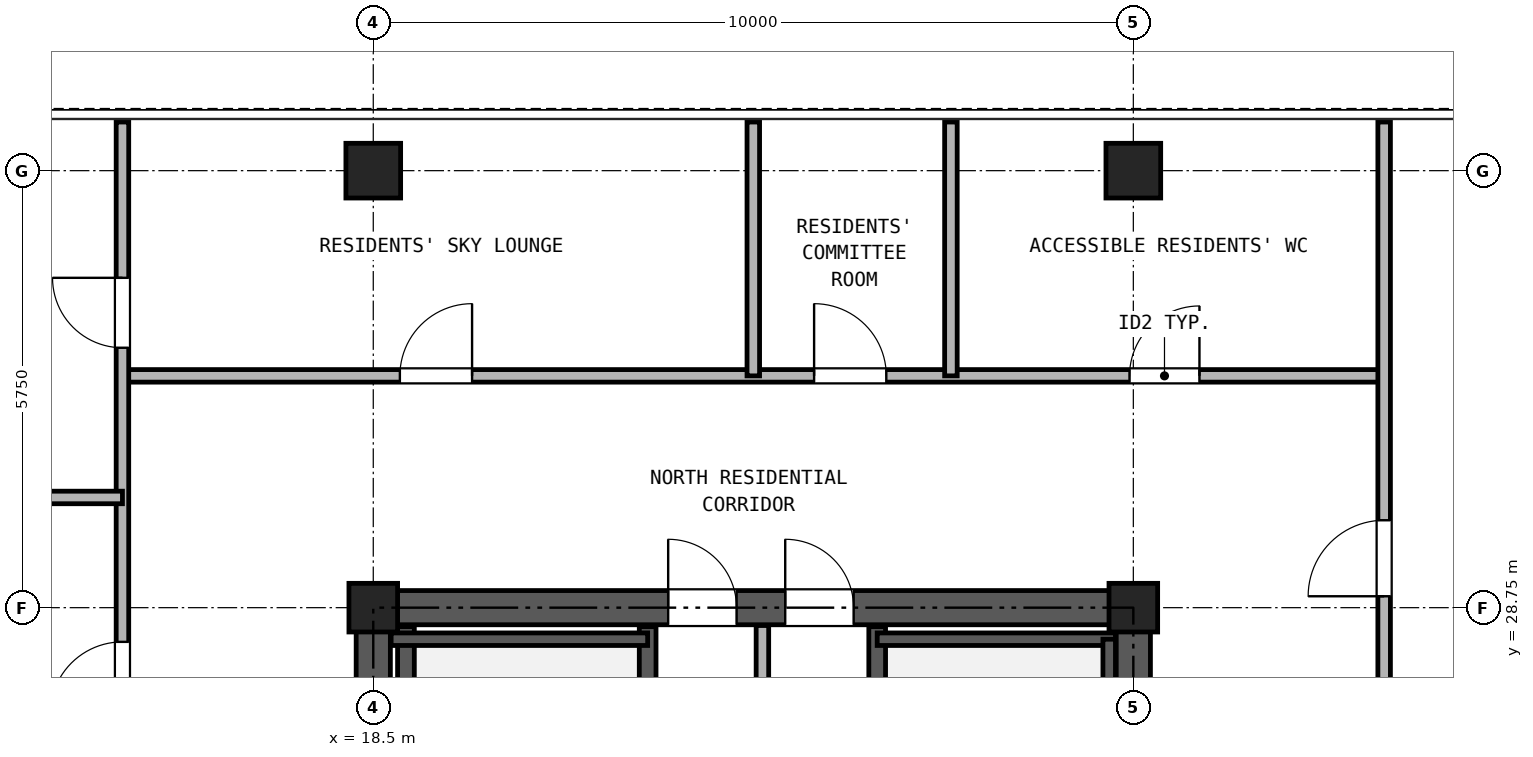
"""IFC4 building model, lengths in metres.
Left out: names, types, materials, properties, quantities, classifications, styles, units other than length and angle.
Written with IfcOpenShell. Run it as: python <this file> out.ifc"""

import sys

from ifc_helpers import new_model, si_unit, direction, frame, frame_2d, origin, origin_2d, place, context, subcontext, project, spatial, rectangle, hollow_rectangle, extrude, source, transform, mapped, element, fill, save


model = new_model("IFC4")
c1 = context("Model", 3, precision=1e-05, world=origin(), true_north=direction((0.0, 1.0)))
c2 = subcontext(c1, "Body", "Model", "MODEL_VIEW")
j1 = project(units=[si_unit("LENGTHUNIT", "METRE"), si_unit("PLANEANGLEUNIT", "RADIAN")], contexts=[c1])
p1 = place(None, origin())
s1 = spatial("IfcSite", under=j1, at=p1, CompositionType="ELEMENT")
p2 = place(p1, origin())
s2 = spatial("IfcBuilding", under=s1, at=p2, CompositionType="ELEMENT")
p3 = place(p2, frame((0.0, 0.0, 165.7)))
s3 = spatial("IfcBuildingStorey", under=s2, at=p3, CompositionType="ELEMENT", Elevation=165.7)
m1 = source(origin(), c2, "Body", "SweptSolid", [
    extrude(hollow_rectangle(XDim=0.72, YDim=0.72, WallThickness=0.04, at=origin_2d()), origin(), (0.0, 0.0, 1.0), 2.95),
])
for number, where, z_axis, x_axis in (
    (1, (18.5, 34.5, 0.0), (0.0, 0.0, 1.0), (1.0, 0.0, 0.0)),
    (2, (28.5, 34.5, 0.0), (0.0, 0.0, 1.0), (1.0, 0.0, 0.0)),
):
    element("IfcColumn", number, at=place(p3, frame(where, z_axis=z_axis, x_axis=x_axis)), inside=s3, PredefinedType="COLUMN", context=c2, shape_type="MappedRepresentation", body=[
        mapped(m1, transform((0.0, 0.0, 0.0), x_axis=(1.0, 0.0, 0.0), y_axis=(0.0, 1.0, 0.0), z_axis=(0.0, 0.0, 1.0), scale=1.0)),
    ])
m2 = source(origin(), c2, "Body", "SweptSolid", [
    extrude(hollow_rectangle(XDim=0.64, YDim=0.64, WallThickness=0.035, at=origin_2d()), origin(), (0.0, 0.0, 1.0), 2.95),
])
for number, where, z_axis, x_axis in (
    (3, (18.5, 28.75, 0.0), (0.0, 0.0, 1.0), (1.0, 0.0, 0.0)),
    (4, (28.5, 28.75, 0.0), (0.0, 0.0, 1.0), (1.0, 0.0, 0.0)),
):
    element("IfcColumn", number, at=place(p3, frame(where, z_axis=z_axis, x_axis=x_axis)), inside=s3, PredefinedType="COLUMN", context=c2, shape_type="MappedRepresentation", body=[
        mapped(m2, transform((0.0, 0.0, 0.0), x_axis=(1.0, 0.0, 0.0), y_axis=(0.0, 1.0, 0.0), z_axis=(0.0, 0.0, 1.0), scale=1.0)),
    ])
p4 = place(p3, frame((18.275, 28.75, 0.0), z_axis=(0.0, 0.0, 1.0), x_axis=(1.0, 0.0, 0.0)))
e5 = element("IfcWall", 5, at=p4, inside=s3, PredefinedType="SHEAR", context=c2, shape_type="SweptSolid", body=[
    extrude(rectangle(XDim=10.45, YDim=0.45, at=frame_2d((5.225, 0.0))), origin(), (0.0, 0.0, 1.0), 2.95),
])
p5 = place(p4, frame((4.105, 0.0, 0.0)))
e6 = element("IfcOpeningElement", 6, at=p5, cuts=e5, PredefinedType="OPENING", context=c2, shape_type="SweptSolid", body=[
    extrude(rectangle(XDim=0.9, YDim=2.05, at=frame_2d((0.45, 1.025))), frame((0.0, 0.235, 0.0), z_axis=(0.0, -1.0, 0.0), x_axis=(1.0, 0.0, 0.0)), (0.0, 0.0, 1.0), 0.47),
])
p6 = place(p4, frame((5.645, 0.0, 0.0)))
e7 = element("IfcOpeningElement", 7, at=p6, cuts=e5, PredefinedType="OPENING", context=c2, shape_type="SweptSolid", body=[
    extrude(rectangle(XDim=0.9, YDim=2.05, at=frame_2d((0.45, 1.025))), frame((0.0, 0.235, 0.0), z_axis=(0.0, -1.0, 0.0), x_axis=(1.0, 0.0, 0.0)), (0.0, 0.0, 1.0), 0.47),
])
p7 = place(p3, frame((18.5, 11.725, 0.0), z_axis=(0.0, 0.0, 1.0), x_axis=(0.0, 1.0, 0.0)))
e8 = element("IfcWall", 8, at=p7, inside=s3, PredefinedType="SHEAR", context=c2, shape_type="SweptSolid", body=[
    extrude(rectangle(XDim=16.8, YDim=0.45, at=frame_2d((8.4, 0.0))), origin(), (0.0, 0.0, 1.0), 2.95),
])
p8 = place(p7, frame((7.425, 0.0, 0.0)))
e9 = element("IfcOpeningElement", 9, at=p8, cuts=e8, PredefinedType="OPENING", context=c2, shape_type="SweptSolid", body=[
    extrude(rectangle(XDim=1.15, YDim=2.2, at=frame_2d((0.575, 1.1))), frame((0.0, 0.235, 0.0), z_axis=(0.0, -1.0, 0.0), x_axis=(1.0, 0.0, 0.0)), (0.0, 0.0, 1.0), 0.47),
])
p9 = place(p3, frame((28.5, 11.725, 0.0), z_axis=(0.0, 0.0, 1.0), x_axis=(0.0, 1.0, 0.0)))
e10 = element("IfcWall", 10, at=p9, inside=s3, PredefinedType="SHEAR", context=c2, shape_type="SweptSolid", body=[
    extrude(rectangle(XDim=16.8, YDim=0.45, at=frame_2d((8.4, 0.0))), origin(), (0.0, 0.0, 1.0), 2.95),
])
p10 = place(p9, frame((7.425, 0.0, 0.0)))
e11 = element("IfcOpeningElement", 11, at=p10, cuts=e10, PredefinedType="OPENING", context=c2, shape_type="SweptSolid", body=[
    extrude(rectangle(XDim=1.15, YDim=2.2, at=frame_2d((0.575, 1.1))), frame((0.0, 0.235, 0.0), z_axis=(0.0, -1.0, 0.0), x_axis=(1.0, 0.0, 0.0)), (0.0, 0.0, 1.0), 0.47),
])
for number, where, z_axis, x_axis in (
    (12, (18.93, 21.39, 0.0), (0.0, 0.0, 1.0), (0.0, 1.0, 0.0)),
    (13, (22.11, 21.39, 0.0), (0.0, 0.0, 1.0), (0.0, 1.0, 0.0)),
    (14, (25.13, 21.39, 0.0), (0.0, 0.0, 1.0), (0.0, 1.0, 0.0)),
):
    element("IfcWall", number, at=place(p3, frame(where, z_axis=z_axis, x_axis=x_axis)), inside=s3, PredefinedType="SOLIDWALL", context=c2, shape_type="SweptSolid", body=[
        extrude(rectangle(XDim=7.11, YDim=0.22, at=frame_2d((3.555, 0.0))), origin(), (0.0, 0.0, 1.0), 2.95),
    ])
p11 = place(p3, frame((18.735, 28.335, 0.0), z_axis=(0.0, 0.0, 1.0), x_axis=(1.0, 0.0, 0.0)))
e15 = element("IfcWall", 15, at=p11, inside=s3, PredefinedType="PARTITIONING", context=c2, shape_type="SweptSolid", body=[
    extrude(rectangle(XDim=3.375, YDim=0.165, at=frame_2d((1.688, 0.0))), origin(), (0.0, 0.0, 1.0), 2.95),
])
p12 = place(p3, frame((25.13, 28.335, 0.0), z_axis=(0.0, 0.0, 1.0), x_axis=(1.0, 0.0, 0.0)))
e16 = element("IfcWall", 16, at=p12, inside=s3, PredefinedType="PARTITIONING", context=c2, shape_type="SweptSolid", body=[
    extrude(rectangle(XDim=3.135, YDim=0.165, at=frame_2d((1.567, 0.0))), origin(), (0.0, 0.0, 1.0), 2.95),
])
p13 = place(p3, frame((28.183, 21.39, 0.0), z_axis=(0.0, 0.0, 1.0), x_axis=(0.0, 1.0, 0.0)))
e17 = element("IfcWall", 17, at=p13, inside=s3, PredefinedType="PARTITIONING", context=c2, shape_type="SweptSolid", body=[
    extrude(rectangle(XDim=6.945, YDim=0.165, at=frame_2d((3.473, 0.0))), origin(), (0.0, 0.0, 1.0), 2.95),
])
p14 = place(p3, frame((23.62, 24.4, 0.0), z_axis=(0.0, 0.0, 1.0), x_axis=(0.0, 1.0, 0.0)))
e18 = element("IfcWall", 18, at=p14, inside=s3, PredefinedType="PARTITIONING", context=c2, shape_type="SweptSolid", body=[
    extrude(rectangle(XDim=4.115, YDim=0.165, at=frame_2d((2.058, 0.0))), origin(), (0.0, 0.0, 1.0), 2.95),
])
p15 = place(p3, frame((15.2, 31.8, 0.0), z_axis=(0.0, 0.0, 1.0), x_axis=(1.0, 0.0, 0.0)))
e19 = element("IfcWall", 19, at=p15, inside=s3, PredefinedType="PARTITIONING", context=c2, shape_type="SweptSolid", body=[
    extrude(rectangle(XDim=16.6, YDim=0.165, at=frame_2d((8.3, 0.0))), origin(), (0.0, 0.0, 1.0), 2.583),
])
p16 = place(p15, frame((3.65, 0.0, 0.0)))
e20 = element("IfcOpeningElement", 20, at=p16, cuts=e19, PredefinedType="OPENING", context=c2, shape_type="SweptSolid", body=[
    extrude(rectangle(XDim=0.95, YDim=2.15, at=frame_2d((0.475, 1.075))), frame((0.0, 0.093, 0.0), z_axis=(0.0, -1.0, 0.0), x_axis=(1.0, 0.0, 0.0)), (0.0, 0.0, 1.0), 0.185),
])
p17 = place(p15, frame((9.1, 0.0, 0.0)))
e21 = element("IfcOpeningElement", 21, at=p17, cuts=e19, PredefinedType="OPENING", context=c2, shape_type="SweptSolid", body=[
    extrude(rectangle(XDim=0.95, YDim=2.15, at=frame_2d((0.475, 1.075))), frame((0.0, 0.093, 0.0), z_axis=(0.0, -1.0, 0.0), x_axis=(1.0, 0.0, 0.0)), (0.0, 0.0, 1.0), 0.185),
])
p18 = place(p15, frame((13.25, 0.0, 0.0)))
e22 = element("IfcOpeningElement", 22, at=p18, cuts=e19, PredefinedType="OPENING", context=c2, shape_type="SweptSolid", body=[
    extrude(rectangle(XDim=0.92, YDim=2.1, at=frame_2d((0.46, 1.05))), frame((0.0, 0.093, 0.0), z_axis=(0.0, -1.0, 0.0), x_axis=(1.0, 0.0, 0.0)), (0.0, 0.0, 1.0), 0.185),
])
p19 = place(p3, frame((15.2, 10.65, 0.0), z_axis=(0.0, 0.0, 1.0), x_axis=(0.0, 1.0, 0.0)))
e23 = element("IfcWall", 23, at=p19, inside=s3, PredefinedType="PARTITIONING", context=c2, shape_type="SweptSolid", body=[
    extrude(rectangle(XDim=24.49, YDim=0.165, at=frame_2d((12.245, 0.0))), origin(), (0.0, 0.0, 1.0), 2.95),
])
p20 = place(p19, frame((3.425, 0.0, 0.0)))
e24 = element("IfcOpeningElement", 24, at=p20, cuts=e23, PredefinedType="OPENING", context=c2, shape_type="SweptSolid", body=[
    extrude(rectangle(XDim=0.95, YDim=2.15, at=frame_2d((0.475, 1.075))), frame((0.0, 0.093, 0.0), z_axis=(0.0, -1.0, 0.0), x_axis=(1.0, 0.0, 0.0)), (0.0, 0.0, 1.0), 0.185),
])
p21 = place(p19, frame((10.85, 0.0, 0.0)))
e25 = element("IfcOpeningElement", 25, at=p21, cuts=e23, PredefinedType="OPENING", context=c2, shape_type="SweptSolid", body=[
    extrude(rectangle(XDim=0.95, YDim=2.15, at=frame_2d((0.475, 1.075))), frame((0.0, 0.093, 0.0), z_axis=(0.0, -1.0, 0.0), x_axis=(1.0, 0.0, 0.0)), (0.0, 0.0, 1.0), 0.185),
])
p22 = place(p19, frame((16.7, 0.0, 0.0)))
e26 = element("IfcOpeningElement", 26, at=p22, cuts=e23, PredefinedType="OPENING", context=c2, shape_type="SweptSolid", body=[
    extrude(rectangle(XDim=0.95, YDim=2.15, at=frame_2d((0.475, 1.075))), frame((0.0, 0.093, 0.0), z_axis=(0.0, -1.0, 0.0), x_axis=(1.0, 0.0, 0.0)), (0.0, 0.0, 1.0), 0.185),
])
p23 = place(p19, frame((21.52, 0.0, 0.0)))
e27 = element("IfcOpeningElement", 27, at=p23, cuts=e23, PredefinedType="OPENING", context=c2, shape_type="SweptSolid", body=[
    extrude(rectangle(XDim=0.92, YDim=2.1, at=frame_2d((0.46, 1.05))), frame((0.0, 0.093, 0.0), z_axis=(0.0, -1.0, 0.0), x_axis=(1.0, 0.0, 0.0)), (0.0, 0.0, 1.0), 0.185),
])
p24 = place(p3, frame((31.8, 10.65, 0.0), z_axis=(0.0, 0.0, 1.0), x_axis=(0.0, 1.0, 0.0)))
e28 = element("IfcWall", 28, at=p24, inside=s3, PredefinedType="PARTITIONING", context=c2, shape_type="SweptSolid", body=[
    extrude(rectangle(XDim=24.49, YDim=0.165, at=frame_2d((12.245, 0.0))), origin(), (0.0, 0.0, 1.0), 2.95),
])
p25 = place(p24, frame((3.425, 0.0, 0.0)))
e29 = element("IfcOpeningElement", 29, at=p25, cuts=e28, PredefinedType="OPENING", context=c2, shape_type="SweptSolid", body=[
    extrude(rectangle(XDim=1.0, YDim=2.15, at=frame_2d((0.5, 1.075))), frame((0.0, 0.093, 0.0), z_axis=(0.0, -1.0, 0.0), x_axis=(1.0, 0.0, 0.0)), (0.0, 0.0, 1.0), 0.185),
])
p26 = place(p24, frame((11.6, 0.0, 0.0)))
e30 = element("IfcOpeningElement", 30, at=p26, cuts=e28, PredefinedType="OPENING", context=c2, shape_type="SweptSolid", body=[
    extrude(rectangle(XDim=1.0, YDim=2.15, at=frame_2d((0.5, 1.075))), frame((0.0, 0.093, 0.0), z_axis=(0.0, -1.0, 0.0), x_axis=(1.0, 0.0, 0.0)), (0.0, 0.0, 1.0), 0.185),
])
p27 = place(p24, frame((18.25, 0.0, 0.0)))
e31 = element("IfcOpeningElement", 31, at=p27, cuts=e28, PredefinedType="OPENING", context=c2, shape_type="SweptSolid", body=[
    extrude(rectangle(XDim=1.0, YDim=2.15, at=frame_2d((0.5, 1.075))), frame((0.0, 0.093, 0.0), z_axis=(0.0, -1.0, 0.0), x_axis=(1.0, 0.0, 0.0)), (0.0, 0.0, 1.0), 0.185),
])
p28 = place(p3, frame((0.16, 30.2, 0.0), z_axis=(0.0, 0.0, 1.0), x_axis=(1.0, 0.0, 0.0)))
e32 = element("IfcWall", 32, at=p28, inside=s3, PredefinedType="PARTITIONING", context=c2, shape_type="SweptSolid", body=[
    extrude(rectangle(XDim=15.04, YDim=0.165, at=frame_2d((7.52, 0.0))), origin(), (0.0, 0.0, 1.0), 2.95),
])
for number, where, z_axis, x_axis in (
    (33, (23.5, 31.8, 0.0), (0.0, 0.0, 1.0), (0.0, 1.0, 0.0)),
    (34, (26.1, 31.8, 0.0), (0.0, 0.0, 1.0), (0.0, 1.0, 0.0)),
):
    element("IfcWall", number, at=place(p3, frame(where, z_axis=z_axis, x_axis=x_axis)), inside=s3, PredefinedType="PARTITIONING", context=c2, shape_type="SweptSolid", body=[
        extrude(rectangle(XDim=3.34, YDim=0.165, at=frame_2d((1.67, 0.0))), origin(), (0.0, 0.0, 1.0), 2.95),
    ])
p29 = place(p5, origin())
e35 = element("IfcDoor", 35, at=p29, inside=s3, OperationType="SINGLE_SWING_LEFT", PredefinedType="DOOR", context=c2, shape_type="SweptSolid", body=[
    extrude(rectangle(XDim=0.9, YDim=2.05, at=frame_2d((0.45, 1.025))), frame((0.0, 0.025, 0.0), z_axis=(0.0, -1.0, 0.0), x_axis=(1.0, 0.0, 0.0)), (0.0, 0.0, 1.0), 0.05),
])
fill(e6, e35)
p30 = place(p6, origin())
e36 = element("IfcDoor", 36, at=p30, inside=s3, OperationType="SINGLE_SWING_LEFT", PredefinedType="DOOR", context=c2, shape_type="SweptSolid", body=[
    extrude(rectangle(XDim=0.9, YDim=2.05, at=frame_2d((0.45, 1.025))), frame((0.0, 0.025, 0.0), z_axis=(0.0, -1.0, 0.0), x_axis=(1.0, 0.0, 0.0)), (0.0, 0.0, 1.0), 0.05),
])
fill(e7, e36)
p31 = place(p22, frame((0.95, 0.0, 0.0), z_axis=(0.0, 0.0, 1.0), x_axis=(-1.0, 0.0, 0.0)))
e37 = element("IfcDoor", 37, at=p31, inside=s3, OperationType="SINGLE_SWING_LEFT", PredefinedType="DOOR", context=c2, shape_type="SweptSolid", body=[
    extrude(rectangle(XDim=0.95, YDim=2.15, at=frame_2d((0.475, 1.075))), frame((0.0, 0.025, 0.0), z_axis=(0.0, -1.0, 0.0), x_axis=(1.0, 0.0, 0.0)), (0.0, 0.0, 1.0), 0.05),
])
fill(e26, e37)
p32 = place(p23, frame((0.92, 0.0, 0.0), z_axis=(0.0, 0.0, 1.0), x_axis=(-1.0, 0.0, 0.0)))
e38 = element("IfcDoor", 38, at=p32, inside=s3, OperationType="SINGLE_SWING_RIGHT", PredefinedType="DOOR", context=c2, shape_type="SweptSolid", body=[
    extrude(rectangle(XDim=0.92, YDim=2.1, at=frame_2d((0.46, 1.05))), frame((0.0, 0.025, 0.0), z_axis=(0.0, -1.0, 0.0), x_axis=(1.0, 0.0, 0.0)), (0.0, 0.0, 1.0), 0.05),
])
fill(e27, e38)
p33 = place(p27, frame((1.0, 0.0, 0.0), z_axis=(0.0, 0.0, 1.0), x_axis=(-1.0, 0.0, 0.0)))
e39 = element("IfcDoor", 39, at=p33, inside=s3, OperationType="SINGLE_SWING_LEFT", PredefinedType="DOOR", context=c2, shape_type="SweptSolid", body=[
    extrude(rectangle(XDim=1.0, YDim=2.15, at=frame_2d((0.5, 1.075))), frame((0.0, 0.025, 0.0), z_axis=(0.0, -1.0, 0.0), x_axis=(1.0, 0.0, 0.0)), (0.0, 0.0, 1.0), 0.05),
])
fill(e31, e39)
p34 = place(p16, origin())
e40 = element("IfcDoor", 40, at=p34, inside=s3, OperationType="SINGLE_SWING_RIGHT", PredefinedType="DOOR", context=c2, shape_type="SweptSolid", body=[
    extrude(rectangle(XDim=0.95, YDim=2.15, at=frame_2d((0.475, 1.075))), frame((0.0, 0.025, 0.0), z_axis=(0.0, -1.0, 0.0), x_axis=(1.0, 0.0, 0.0)), (0.0, 0.0, 1.0), 0.05),
])
fill(e20, e40)
p35 = place(p17, origin())
e41 = element("IfcDoor", 41, at=p35, inside=s3, OperationType="SINGLE_SWING_LEFT", PredefinedType="DOOR", context=c2, shape_type="SweptSolid", body=[
    extrude(rectangle(XDim=0.95, YDim=2.15, at=frame_2d((0.475, 1.075))), frame((0.0, 0.025, 0.0), z_axis=(0.0, -1.0, 0.0), x_axis=(1.0, 0.0, 0.0)), (0.0, 0.0, 1.0), 0.05),
])
fill(e21, e41)
p36 = place(p18, origin())
e42 = element("IfcDoor", 42, at=p36, inside=s3, OperationType="SINGLE_SWING_RIGHT", PredefinedType="DOOR", context=c2, shape_type="SweptSolid", body=[
    extrude(rectangle(XDim=0.92, YDim=2.1, at=frame_2d((0.46, 1.05))), frame((0.0, 0.025, 0.0), z_axis=(0.0, -1.0, 0.0), x_axis=(1.0, 0.0, 0.0)), (0.0, 0.0, 1.0), 0.05),
])
fill(e22, e42)
save(model, sys.argv[1])
